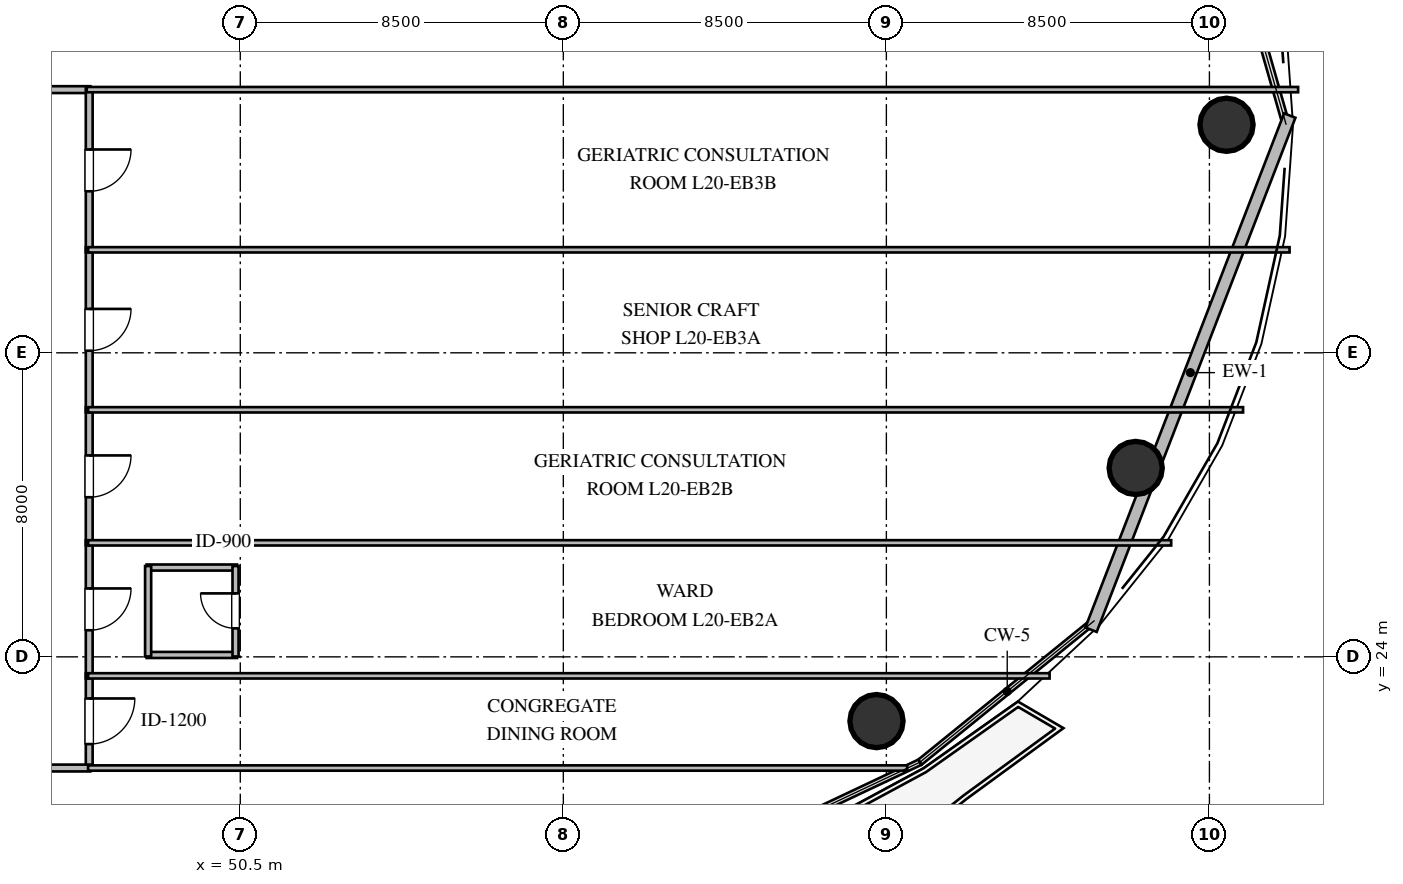
"""IFC4 building model, lengths in metres.
Left out: names, types, materials, properties, quantities, classifications, styles, units other than length and angle.
Written with IfcOpenShell. Run it as: python <this file> out.ifc"""

import sys

from ifc_helpers import new_model, si_unit, direction, frame, frame_2d, origin, origin_2d, place, context, subcontext, project, spatial, rectangle, circle, extrude, element, fill, save


model = new_model("IFC4")
c1 = context("Model", 3, precision=1e-05, world=origin(), true_north=direction((0.0, 1.0)))
c2 = subcontext(c1, "Body", "Model", "MODEL_VIEW")
j1 = project(units=[si_unit("LENGTHUNIT", "METRE"), si_unit("PLANEANGLEUNIT", "RADIAN")], contexts=[c1])
p1 = place(None, origin())
s1 = spatial("IfcSite", under=j1, at=p1, CompositionType="ELEMENT")
p2 = place(p1, origin())
s2 = spatial("IfcBuilding", under=s1, at=p2, CompositionType="ELEMENT")
p3 = place(p2, frame((0.0, 0.0, 78.0)))
s3 = spatial("IfcBuildingStorey", under=s2, at=p3, CompositionType="ELEMENT", Elevation=78.0)
for number, where, z_axis, x_axis in (
    (1, (76.45, 38.0, 0.0), (0.0, 0.0, 1.0), (1.0, 0.0, 0.0)),
    (2, (67.24, 22.31, 0.0), (0.0, 0.0, 1.0), (1.0, 0.0, 0.0)),
    (3, (74.06, 28.97, 0.0), (0.0, 0.0, 1.0), (1.0, 0.0, 0.0)),
):
    element("IfcColumn", number, at=place(p3, frame(where, z_axis=z_axis, x_axis=x_axis)), inside=s3, PredefinedType="COLUMN", context=c2, shape_type="SweptSolid", body=[
        extrude(circle(Radius=0.7, at=origin_2d()), origin(), (0.0, 0.0, 1.0), 3.6),
    ])
p4 = place(p3, frame((78.114, 38.243, 0.0), z_axis=(0.0, 0.0, 1.0), x_axis=(-0.360517110943, -0.932752599952, 0.0)))
e4 = element("IfcWall", 4, at=p4, inside=s3, PredefinedType="STANDARD", context=c2, shape_type="SweptSolid", body=[
    extrude(rectangle(XDim=14.504, YDim=0.32, at=frame_2d((7.252, 0.0))), origin(), (0.0, 0.0, 1.0), 2.738),
])
p5 = place(p3, frame((48.035, 24.05, 0.0), z_axis=(0.0, 0.0, 1.0), x_axis=(1.0, 0.0, 0.0)))
e5 = element("IfcWall", 5, at=p5, inside=s3, PredefinedType="PLUMBINGWALL", context=c2, shape_type="SweptSolid", body=[
    extrude(rectangle(XDim=2.38, YDim=0.16, at=frame_2d((1.19, 0.0))), origin(), (0.0, 0.0, 1.0), 2.806),
])
p6 = place(p3, frame((48.035, 26.35, 0.0), z_axis=(0.0, 0.0, 1.0), x_axis=(1.0, 0.0, 0.0)))
e6 = element("IfcWall", 6, at=p6, inside=s3, PredefinedType="PLUMBINGWALL", context=c2, shape_type="SweptSolid", body=[
    extrude(rectangle(XDim=2.38, YDim=0.16, at=frame_2d((1.19, 0.0))), origin(), (0.0, 0.0, 1.0), 3.36),
])
p7 = place(p3, frame((48.075, 24.01, 0.0), z_axis=(0.0, 0.0, 1.0), x_axis=(0.0, 1.0, 0.0)))
e7 = element("IfcWall", 7, at=p7, inside=s3, PredefinedType="PLUMBINGWALL", context=c2, shape_type="SweptSolid", body=[
    extrude(rectangle(XDim=2.38, YDim=0.16, at=frame_2d((1.19, 0.0))), origin(), (0.0, 0.0, 1.0), 3.36),
])
p8 = place(p3, frame((50.375, 24.01, 0.0), z_axis=(0.0, 0.0, 1.0), x_axis=(0.0, 1.0, 0.0)))
e8 = element("IfcWall", 8, at=p8, inside=s3, PredefinedType="PLUMBINGWALL", context=c2, shape_type="SweptSolid", body=[
    extrude(rectangle(XDim=2.38, YDim=0.16, at=frame_2d((1.19, 0.0))), origin(), (0.0, 0.0, 1.0), 3.36),
])
p9 = place(p8, frame((0.74, 0.0, 0.0)))
e9 = element("IfcOpeningElement", 9, at=p9, cuts=e8, PredefinedType="OPENING", context=c2, shape_type="SweptSolid", body=[
    extrude(rectangle(XDim=0.92, YDim=2.1, at=frame_2d((0.46, 1.05))), frame((0.0, 0.09, 0.0), z_axis=(0.0, -1.0, 0.0), x_axis=(1.0, 0.0, 0.0)), (0.0, 0.0, 1.0), 0.18),
])
p10 = place(p3, frame((41.935, 38.925, 0.0), z_axis=(0.0, 0.0, 1.0), x_axis=(1.0, 0.0, 0.0)))
e10 = element("IfcWall", 10, at=p10, inside=s3, PredefinedType="PARTITIONING", context=c2, shape_type="SweptSolid", body=[
    extrude(rectangle(XDim=4.62, YDim=0.18, at=frame_2d((2.31, 0.0))), origin(), (0.0, 0.0, 1.0), 3.36),
])
p11 = place(p10, frame((1.76, 0.0, 0.0)))
e11 = element("IfcOpeningElement", 11, at=p11, cuts=e10, PredefinedType="OPENING", context=c2, shape_type="SweptSolid", body=[
    extrude(rectangle(XDim=1.1, YDim=2.1, at=frame_2d((0.55, 1.05))), frame((0.0, 0.1, 0.0), z_axis=(0.0, -1.0, 0.0), x_axis=(1.0, 0.0, 0.0)), (0.0, 0.0, 1.0), 0.2),
])
p12 = place(p3, frame((46.525, 23.565, 0.0), z_axis=(0.0, 0.0, 1.0), x_axis=(0.0, -1.0, 0.0)))
e12 = element("IfcWall", 12, at=p12, inside=s3, PredefinedType="PARTITIONING", context=c2, shape_type="SweptSolid", body=[
    extrude(rectangle(XDim=2.52, YDim=0.18, at=frame_2d((1.26, 0.0))), origin(), (0.0, 0.0, 1.0), 3.36),
])
p13 = place(p12, frame((0.66, 0.0, 0.0)))
e13 = element("IfcOpeningElement", 13, at=p13, cuts=e12, PredefinedType="OPENING", context=c2, shape_type="SweptSolid", body=[
    extrude(rectangle(XDim=1.2, YDim=2.15, at=frame_2d((0.6, 1.075))), frame((0.0, 0.1, 0.0), z_axis=(0.0, -1.0, 0.0), x_axis=(1.0, 0.0, 0.0)), (0.0, 0.0, 1.0), 0.2),
])
p14 = place(p3, frame((46.525, 27.065, 0.0), z_axis=(0.0, 0.0, 1.0), x_axis=(0.0, -1.0, 0.0)))
e14 = element("IfcWall", 14, at=p14, inside=s3, PredefinedType="PARTITIONING", context=c2, shape_type="SweptSolid", body=[
    extrude(rectangle(XDim=3.63, YDim=0.18, at=frame_2d((1.815, 0.0))), origin(), (0.0, 0.0, 1.0), 3.36),
])
p15 = place(p14, frame((1.265, 0.0, 0.0)))
e15 = element("IfcOpeningElement", 15, at=p15, cuts=e14, PredefinedType="OPENING", context=c2, shape_type="SweptSolid", body=[
    extrude(rectangle(XDim=1.1, YDim=2.1, at=frame_2d((0.55, 1.05))), frame((0.0, 0.1, 0.0), z_axis=(0.0, -1.0, 0.0), x_axis=(1.0, 0.0, 0.0)), (0.0, 0.0, 1.0), 0.2),
])
p16 = place(p3, frame((46.525, 30.565, 0.0), z_axis=(0.0, 0.0, 1.0), x_axis=(0.0, -1.0, 0.0)))
e16 = element("IfcWall", 16, at=p16, inside=s3, PredefinedType="PARTITIONING", context=c2, shape_type="SweptSolid", body=[
    extrude(rectangle(XDim=3.63, YDim=0.18, at=frame_2d((1.815, 0.0))), origin(), (0.0, 0.0, 1.0), 3.36),
])
p17 = place(p16, frame((1.265, 0.0, 0.0)))
e17 = element("IfcOpeningElement", 17, at=p17, cuts=e16, PredefinedType="OPENING", context=c2, shape_type="SweptSolid", body=[
    extrude(rectangle(XDim=1.1, YDim=2.1, at=frame_2d((0.55, 1.05))), frame((0.0, 0.1, 0.0), z_axis=(0.0, -1.0, 0.0), x_axis=(1.0, 0.0, 0.0)), (0.0, 0.0, 1.0), 0.2),
])
p18 = place(p3, frame((46.525, 34.775, 0.0), z_axis=(0.0, 0.0, 1.0), x_axis=(0.0, -1.0, 0.0)))
e18 = element("IfcWall", 18, at=p18, inside=s3, PredefinedType="PARTITIONING", context=c2, shape_type="SweptSolid", body=[
    extrude(rectangle(XDim=4.34, YDim=0.18, at=frame_2d((2.17, 0.0))), origin(), (0.0, 0.0, 1.0), 3.36),
])
p19 = place(p18, frame((1.62, 0.0, 0.0)))
e19 = element("IfcOpeningElement", 19, at=p19, cuts=e18, PredefinedType="OPENING", context=c2, shape_type="SweptSolid", body=[
    extrude(rectangle(XDim=1.1, YDim=2.1, at=frame_2d((0.55, 1.05))), frame((0.0, 0.1, 0.0), z_axis=(0.0, -1.0, 0.0), x_axis=(1.0, 0.0, 0.0)), (0.0, 0.0, 1.0), 0.2),
])
p20 = place(p3, frame((46.525, 38.955, 0.0), z_axis=(0.0, 0.0, 1.0), x_axis=(0.0, -1.0, 0.0)))
e20 = element("IfcWall", 20, at=p20, inside=s3, PredefinedType="PARTITIONING", context=c2, shape_type="SweptSolid", body=[
    extrude(rectangle(XDim=4.31, YDim=0.18, at=frame_2d((2.155, 0.0))), origin(), (0.0, 0.0, 1.0), 3.36),
])
p21 = place(p20, frame((1.605, 0.0, 0.0)))
e21 = element("IfcOpeningElement", 21, at=p21, cuts=e20, PredefinedType="OPENING", context=c2, shape_type="SweptSolid", body=[
    extrude(rectangle(XDim=1.1, YDim=2.1, at=frame_2d((0.55, 1.05))), frame((0.0, 0.1, 0.0), z_axis=(0.0, -1.0, 0.0), x_axis=(1.0, 0.0, 0.0)), (0.0, 0.0, 1.0), 0.2),
])
p22 = place(p3, frame((46.555, 21.075, 0.0), z_axis=(0.0, 0.0, 1.0), x_axis=(-1.0, 0.0, 0.0)))
e22 = element("IfcWall", 22, at=p22, inside=s3, PredefinedType="PARTITIONING", context=c2, shape_type="SweptSolid", body=[
    extrude(rectangle(XDim=11.12, YDim=0.18, at=frame_2d((5.56, 0.0))), origin(), (0.0, 0.0, 1.0), 2.996),
])
p23 = place(p22, frame((4.96, 0.0, 0.0)))
e23 = element("IfcOpeningElement", 23, at=p23, cuts=e22, PredefinedType="OPENING", context=c2, shape_type="SweptSolid", body=[
    extrude(rectangle(XDim=1.2, YDim=2.15, at=frame_2d((0.6, 1.075))), frame((0.0, 0.1, 0.0), z_axis=(0.0, -1.0, 0.0), x_axis=(1.0, 0.0, 0.0)), (0.0, 0.0, 1.0), 0.2),
])
p24 = place(p3, frame((78.334, 38.925, 0.0), z_axis=(0.0, 0.0, 1.0), x_axis=(-1.0, 0.0, 0.0)))
e24 = element("IfcWall", 24, at=p24, inside=s3, PredefinedType="PARTITIONING", context=c2, shape_type="SweptSolid", body=[
    extrude(rectangle(XDim=31.874, YDim=0.14, at=frame_2d((15.937, 0.0))), origin(), (0.0, 0.0, 1.0), 3.36),
])
p25 = place(p3, frame((46.495, 23.5, 0.0), z_axis=(0.0, 0.0, 1.0), x_axis=(1.0, 0.0, 0.0)))
e25 = element("IfcWall", 25, at=p25, inside=s3, PredefinedType="PARTITIONING", context=c2, shape_type="SweptSolid", body=[
    extrude(rectangle(XDim=25.3, YDim=0.14, at=frame_2d((12.65, 0.0))), origin(), (0.0, 0.0, 1.0), 2.806),
])
p26 = place(p3, frame((68.049, 21.075, 0.0), z_axis=(0.0, 0.0, 1.0), x_axis=(-1.0, 0.0, 0.0)))
e26 = element("IfcWall", 26, at=p26, inside=s3, PredefinedType="PARTITIONING", context=c2, shape_type="SweptSolid", body=[
    extrude(rectangle(XDim=21.554, YDim=0.14, at=frame_2d((10.777, 0.0))), origin(), (0.0, 0.0, 1.0), 2.996),
])
p27 = place(p3, frame((46.495, 27.0, 0.0), z_axis=(0.0, 0.0, 1.0), x_axis=(1.0, 0.0, 0.0)))
e27 = element("IfcWall", 27, at=p27, inside=s3, PredefinedType="PARTITIONING", context=c2, shape_type="SweptSolid", body=[
    extrude(rectangle(XDim=28.499, YDim=0.14, at=frame_2d((14.25, 0.0))), origin(), (0.0, 0.0, 1.0), 2.806),
])
p28 = place(p3, frame((46.495, 30.5, 0.0), z_axis=(0.0, 0.0, 1.0), x_axis=(1.0, 0.0, 0.0)))
e28 = element("IfcWall", 28, at=p28, inside=s3, PredefinedType="PARTITIONING", context=c2, shape_type="SweptSolid", body=[
    extrude(rectangle(XDim=30.391, YDim=0.14, at=frame_2d((15.195, 0.0))), origin(), (0.0, 0.0, 1.0), 3.36),
])
p29 = place(p3, frame((46.495, 34.71, 0.0), z_axis=(0.0, 0.0, 1.0), x_axis=(1.0, 0.0, 0.0)))
e29 = element("IfcWall", 29, at=p29, inside=s3, PredefinedType="PARTITIONING", context=c2, shape_type="SweptSolid", body=[
    extrude(rectangle(XDim=31.614, YDim=0.14, at=frame_2d((15.807, 0.0))), origin(), (0.0, 0.0, 1.0), 3.36),
])
p30 = place(p9, origin())
e30 = element("IfcDoor", 30, at=p30, inside=s3, OperationType="SINGLE_SWING_RIGHT", PredefinedType="DOOR", context=c2, shape_type="SweptSolid", body=[
    extrude(rectangle(XDim=0.92, YDim=2.1, at=frame_2d((0.46, 1.05))), frame((0.0, 0.025, 0.0), z_axis=(0.0, -1.0, 0.0), x_axis=(1.0, 0.0, 0.0)), (0.0, 0.0, 1.0), 0.05),
])
fill(e9, e30)
p31 = place(p13, origin())
e31 = element("IfcDoor", 31, at=p31, inside=s3, OperationType="SINGLE_SWING_LEFT", PredefinedType="DOOR", context=c2, shape_type="SweptSolid", body=[
    extrude(rectangle(XDim=1.2, YDim=2.15, at=frame_2d((0.6, 1.075))), frame((0.0, 0.025, 0.0), z_axis=(0.0, -1.0, 0.0), x_axis=(1.0, 0.0, 0.0)), (0.0, 0.0, 1.0), 0.05),
])
fill(e13, e31)
p32 = place(p15, origin())
e32 = element("IfcDoor", 32, at=p32, inside=s3, OperationType="SINGLE_SWING_LEFT", PredefinedType="DOOR", context=c2, shape_type="SweptSolid", body=[
    extrude(rectangle(XDim=1.1, YDim=2.1, at=frame_2d((0.55, 1.05))), frame((0.0, 0.025, 0.0), z_axis=(0.0, -1.0, 0.0), x_axis=(1.0, 0.0, 0.0)), (0.0, 0.0, 1.0), 0.05),
])
fill(e15, e32)
p33 = place(p17, origin())
e33 = element("IfcDoor", 33, at=p33, inside=s3, OperationType="SINGLE_SWING_LEFT", PredefinedType="DOOR", context=c2, shape_type="SweptSolid", body=[
    extrude(rectangle(XDim=1.1, YDim=2.1, at=frame_2d((0.55, 1.05))), frame((0.0, 0.025, 0.0), z_axis=(0.0, -1.0, 0.0), x_axis=(1.0, 0.0, 0.0)), (0.0, 0.0, 1.0), 0.05),
])
fill(e17, e33)
p34 = place(p19, origin())
e34 = element("IfcDoor", 34, at=p34, inside=s3, OperationType="SINGLE_SWING_LEFT", PredefinedType="DOOR", context=c2, shape_type="SweptSolid", body=[
    extrude(rectangle(XDim=1.1, YDim=2.1, at=frame_2d((0.55, 1.05))), frame((0.0, 0.025, 0.0), z_axis=(0.0, -1.0, 0.0), x_axis=(1.0, 0.0, 0.0)), (0.0, 0.0, 1.0), 0.05),
])
fill(e19, e34)
p35 = place(p21, origin())
e35 = element("IfcDoor", 35, at=p35, inside=s3, OperationType="SINGLE_SWING_LEFT", PredefinedType="DOOR", context=c2, shape_type="SweptSolid", body=[
    extrude(rectangle(XDim=1.1, YDim=2.1, at=frame_2d((0.55, 1.05))), frame((0.0, 0.025, 0.0), z_axis=(0.0, -1.0, 0.0), x_axis=(1.0, 0.0, 0.0)), (0.0, 0.0, 1.0), 0.05),
])
fill(e21, e35)
save(model, sys.argv[1])
